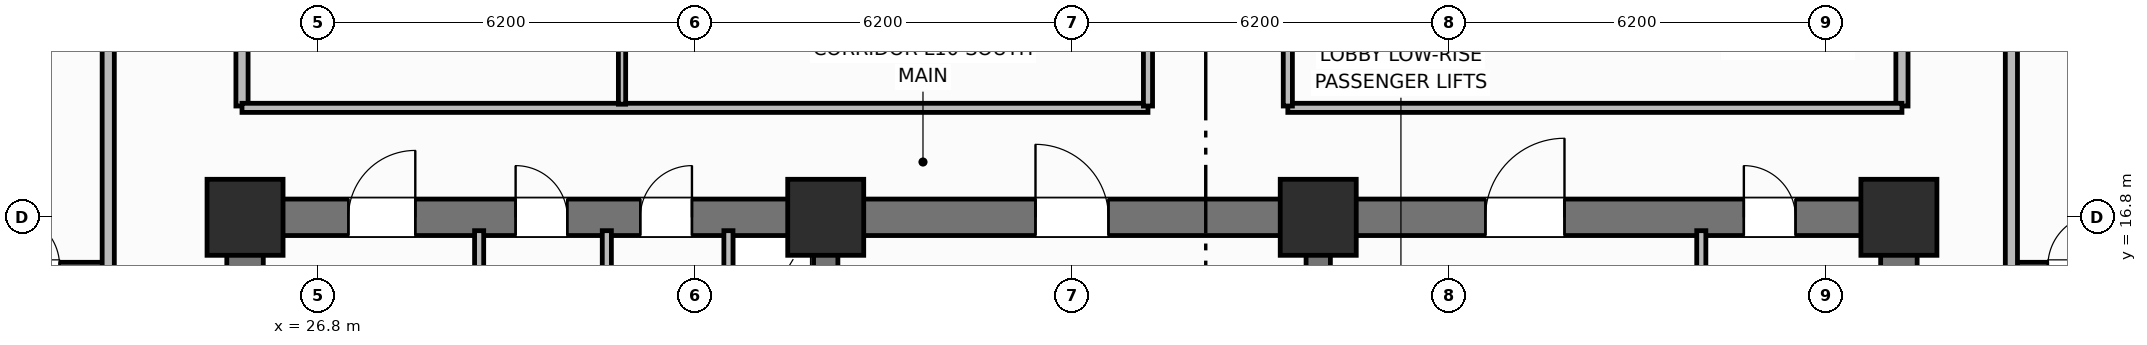
"""IFC4 building model, lengths in metres.
Left out: names, types, materials, properties, quantities, classifications, styles, units other than length and angle.
Written with IfcOpenShell. Run it as: python <this file> out.ifc"""

import sys

from ifc_helpers import new_model, si_unit, direction, frame, frame_2d, origin, origin_2d, place, context, subcontext, project, spatial, rectangle, extrude, element, fill, save


model = new_model("IFC4")
c1 = context("Model", 3, precision=1e-05, world=origin(), true_north=direction((0.0, 1.0)))
c2 = subcontext(c1, "Body", "Model", "MODEL_VIEW")
j1 = project(units=[si_unit("LENGTHUNIT", "METRE"), si_unit("PLANEANGLEUNIT", "RADIAN")], contexts=[c1])
p1 = place(None, origin())
s1 = spatial("IfcSite", under=j1, at=p1, CompositionType="ELEMENT")
p2 = place(p1, origin())
s2 = spatial("IfcBuilding", under=s1, at=p2, CompositionType="ELEMENT")
p3 = place(p2, frame((0.0, 0.0, 43.6)))
s3 = spatial("IfcBuildingStorey", under=s2, at=p3, CompositionType="ELEMENT", Elevation=43.6)
for number, where, z_axis, x_axis in (
    (1, (25.6, 10.9, 0.0), (0.0, 0.0, 1.0), (0.0, 1.0, 0.0)),
    (2, (52.8, 10.9, 0.0), (0.0, 0.0, 1.0), (0.0, 1.0, 0.0)),
):
    element("IfcWall", number, at=place(p3, frame(where, z_axis=z_axis, x_axis=x_axis)), inside=s3, PredefinedType="SHEAR", context=c2, shape_type="SweptSolid", body=[
        extrude(rectangle(XDim=5.6, YDim=0.6, at=frame_2d((2.8, 0.0))), origin(), (0.0, 0.0, 1.0), 3.7),
    ])
p4 = place(p3, frame((25.6, 16.8, 0.0), z_axis=(0.0, 0.0, 1.0), x_axis=(1.0, 0.0, 0.0)))
e3 = element("IfcWall", 3, at=p4, inside=s3, PredefinedType="SHEAR", context=c2, shape_type="SweptSolid", body=[
    extrude(rectangle(XDim=27.2, YDim=0.6, at=frame_2d((13.6, 0.0))), origin(), (0.0, 0.0, 1.0), 3.7),
])
p5 = place(p4, frame((1.7, 0.0, 0.0)))
e4 = element("IfcOpeningElement", 4, at=p5, cuts=e3, PredefinedType="OPENING", context=c2, shape_type="SweptSolid", body=[
    extrude(rectangle(XDim=1.1, YDim=2.15, at=frame_2d((0.55, 1.075))), frame((0.0, 0.31, 0.0), z_axis=(0.0, -1.0, 0.0), x_axis=(1.0, 0.0, 0.0)), (0.0, 0.0, 1.0), 0.62),
])
p6 = place(p4, frame((4.45, 0.0, 0.0)))
e5 = element("IfcOpeningElement", 5, at=p6, cuts=e3, PredefinedType="OPENING", context=c2, shape_type="SweptSolid", body=[
    extrude(rectangle(XDim=0.85, YDim=2.1, at=frame_2d((0.425, 1.05))), frame((0.0, 0.31, 0.0), z_axis=(0.0, -1.0, 0.0), x_axis=(1.0, 0.0, 0.0)), (0.0, 0.0, 1.0), 0.62),
])
p7 = place(p4, frame((6.5, 0.0, 0.0)))
e6 = element("IfcOpeningElement", 6, at=p7, cuts=e3, PredefinedType="OPENING", context=c2, shape_type="SweptSolid", body=[
    extrude(rectangle(XDim=0.85, YDim=2.1, at=frame_2d((0.425, 1.05))), frame((0.0, 0.31, 0.0), z_axis=(0.0, -1.0, 0.0), x_axis=(1.0, 0.0, 0.0)), (0.0, 0.0, 1.0), 0.62),
])
p8 = place(p4, frame((13.0, 0.0, 0.0)))
e7 = element("IfcOpeningElement", 7, at=p8, cuts=e3, PredefinedType="OPENING", context=c2, shape_type="SweptSolid", body=[
    extrude(rectangle(XDim=1.2, YDim=2.15, at=frame_2d((0.6, 1.075))), frame((0.0, 0.31, 0.0), z_axis=(0.0, -1.0, 0.0), x_axis=(1.0, 0.0, 0.0)), (0.0, 0.0, 1.0), 0.62),
])
p9 = place(p4, frame((20.4, 0.0, 0.0)))
e8 = element("IfcOpeningElement", 8, at=p9, cuts=e3, PredefinedType="OPENING", context=c2, shape_type="SweptSolid", body=[
    extrude(rectangle(XDim=1.3, YDim=2.2, at=frame_2d((0.65, 1.1))), frame((0.0, 0.31, 0.0), z_axis=(0.0, -1.0, 0.0), x_axis=(1.0, 0.0, 0.0)), (0.0, 0.0, 1.0), 0.62),
])
p10 = place(p4, frame((24.65, 0.0, 0.0)))
e9 = element("IfcOpeningElement", 9, at=p10, cuts=e3, PredefinedType="OPENING", context=c2, shape_type="SweptSolid", body=[
    extrude(rectangle(XDim=0.85, YDim=2.1, at=frame_2d((0.425, 1.05))), frame((0.0, 0.31, 0.0), z_axis=(0.0, -1.0, 0.0), x_axis=(1.0, 0.0, 0.0)), (0.0, 0.0, 1.0), 0.62),
])
for number, where, z_axis, x_axis in (
    (10, (35.15, 10.9, 0.0), (0.0, 0.0, 1.0), (0.0, 1.0, 0.0)),
    (11, (43.25, 10.9, 0.0), (0.0, 0.0, 1.0), (0.0, 1.0, 0.0)),
):
    element("IfcWall", number, at=place(p3, frame(where, z_axis=z_axis, x_axis=x_axis)), inside=s3, PredefinedType="SHEAR", context=c2, shape_type="SweptSolid", body=[
        extrude(rectangle(XDim=5.6, YDim=0.4, at=frame_2d((2.8, 0.0))), origin(), (0.0, 0.0, 1.0), 3.7),
    ])
for number, where, z_axis, x_axis in (
    (12, (25.6, 16.8, 0.0), (0.0, 0.0, 1.0), (1.0, 0.0, 0.0)),
    (13, (35.15, 16.8, 0.0), (0.0, 0.0, 1.0), (1.0, 0.0, 0.0)),
    (14, (43.25, 16.8, 0.0), (0.0, 0.0, 1.0), (1.0, 0.0, 0.0)),
    (15, (52.8, 16.8, 0.0), (0.0, 0.0, 1.0), (1.0, 0.0, 0.0)),
):
    element("IfcColumn", number, at=place(p3, frame(where, z_axis=z_axis, x_axis=x_axis)), inside=s3, PredefinedType="COLUMN", context=c2, shape_type="SweptSolid", body=[
        extrude(rectangle(XDim=1.25, YDim=1.25, at=origin_2d()), origin(), (0.0, 0.0, 1.0), 3.7),
    ])
for number, where, z_axis, x_axis in (
    (16, (29.45, 14.5, 0.0), (0.0, 0.0, 1.0), (0.0, 1.0, 0.0)),
    (17, (31.55, 14.5, 0.0), (0.0, 0.0, 1.0), (0.0, 1.0, 0.0)),
):
    element("IfcWall", number, at=place(p3, frame(where, z_axis=z_axis, x_axis=x_axis)), inside=s3, PredefinedType="PARTITIONING", context=c2, shape_type="SweptSolid", body=[
        extrude(rectangle(XDim=2.08, YDim=0.15, at=frame_2d((1.04, 0.0))), origin(), (0.0, 0.0, 1.0), 2.53),
    ])
p11 = place(p3, frame((33.55, 14.5, 0.0), z_axis=(0.0, 0.0, 1.0), x_axis=(0.0, 1.0, 0.0)))
e18 = element("IfcWall", 18, at=p11, inside=s3, PredefinedType="PARTITIONING", context=c2, shape_type="SweptSolid", body=[
    extrude(rectangle(XDim=2.08, YDim=0.15, at=frame_2d((1.04, 0.0))), origin(), (0.0, 0.0, 1.0), 2.53),
])
p12 = place(p11, frame((0.55, 0.0, 0.0)))
e19 = element("IfcOpeningElement", 19, at=p12, cuts=e18, PredefinedType="OPENING", context=c2, shape_type="SweptSolid", body=[
    extrude(rectangle(XDim=0.85, YDim=2.05, at=frame_2d((0.425, 1.025))), frame((0.0, 0.085, 0.0), z_axis=(0.0, -1.0, 0.0), x_axis=(1.0, 0.0, 0.0)), (0.0, 0.0, 1.0), 0.17),
])
p13 = place(p3, frame((49.55, 13.7, 0.0), z_axis=(0.0, 0.0, 1.0), x_axis=(0.0, 1.0, 0.0)))
e20 = element("IfcWall", 20, at=p13, inside=s3, PredefinedType="PARTITIONING", context=c2, shape_type="SweptSolid", body=[
    extrude(rectangle(XDim=2.88, YDim=0.15, at=frame_2d((1.44, 0.0))), origin(), (0.0, 0.0, 1.0), 2.53),
])
for number, where, z_axis, x_axis in (
    (21, (25.55, 18.63, 0.0), (0.0, 0.0, 1.0), (0.0, 1.0, 0.0)),
    (22, (52.85, 18.63, 0.0), (0.0, 0.0, 1.0), (0.0, 1.0, 0.0)),
):
    element("IfcWall", number, at=place(p3, frame(where, z_axis=z_axis, x_axis=x_axis)), inside=s3, PredefinedType="PARTITIONING", context=c2, shape_type="SweptSolid", body=[
        extrude(rectangle(XDim=19.14, YDim=0.2, at=frame_2d((9.57, 0.0))), origin(), (0.0, 0.0, 1.0), 2.53),
    ])
p14 = place(p3, frame((25.55, 18.6, 0.0), z_axis=(0.0, 0.0, 1.0), x_axis=(1.0, 0.0, 0.0)))
e23 = element("IfcWall", 23, at=p14, inside=s3, PredefinedType="PARTITIONING", context=c2, shape_type="SweptSolid", body=[
    extrude(rectangle(XDim=14.9, YDim=0.15, at=frame_2d((7.45, 0.0))), origin(), (0.0, 0.0, 1.0), 2.53),
])
p15 = place(p3, frame((42.75, 18.6, 0.0), z_axis=(0.0, 0.0, 1.0), x_axis=(1.0, 0.0, 0.0)))
e24 = element("IfcWall", 24, at=p15, inside=s3, PredefinedType="PARTITIONING", context=c2, shape_type="SweptSolid", body=[
    extrude(rectangle(XDim=10.1, YDim=0.15, at=frame_2d((5.05, 0.0))), origin(), (0.0, 0.0, 1.0), 2.53),
])
p16 = place(p3, frame((31.8, 18.66, 0.0), z_axis=(0.0, 0.0, 1.0), x_axis=(0.0, 1.0, 0.0)))
e25 = element("IfcWall", 25, at=p16, inside=s3, PredefinedType="PARTITIONING", context=c2, shape_type="SweptSolid", body=[
    extrude(rectangle(XDim=9.49, YDim=0.12, at=frame_2d((4.745, 0.0))), origin(), (0.0, 0.0, 1.0), 2.53),
])
p17 = place(p16, frame((2.2, 0.0, 0.0)))
e26 = element("IfcOpeningElement", 26, at=p17, cuts=e25, PredefinedType="OPENING", context=c2, shape_type="SweptSolid", body=[
    extrude(rectangle(XDim=0.9, YDim=2.1, at=frame_2d((0.45, 1.05))), frame((0.0, 0.07, 0.0), z_axis=(0.0, -1.0, 0.0), x_axis=(1.0, 0.0, 0.0)), (0.0, 0.0, 1.0), 0.14),
])
p18 = place(p3, frame((40.45, 18.63, 0.0), z_axis=(0.0, 0.0, 1.0), x_axis=(0.0, 1.0, 0.0)))
e27 = element("IfcWall", 27, at=p18, inside=s3, PredefinedType="PARTITIONING", context=c2, shape_type="SweptSolid", body=[
    extrude(rectangle(XDim=19.14, YDim=0.15, at=frame_2d((9.57, 0.0))), origin(), (0.0, 0.0, 1.0), 2.53),
])
p19 = place(p18, frame((2.4, 0.0, 0.0)))
e28 = element("IfcOpeningElement", 28, at=p19, cuts=e27, PredefinedType="OPENING", context=c2, shape_type="SweptSolid", body=[
    extrude(rectangle(XDim=1.0, YDim=2.15, at=frame_2d((0.5, 1.075))), frame((0.0, 0.085, 0.0), z_axis=(0.0, -1.0, 0.0), x_axis=(1.0, 0.0, 0.0)), (0.0, 0.0, 1.0), 0.17),
])
p20 = place(p18, frame((11.4, 0.0, 0.0)))
e29 = element("IfcOpeningElement", 29, at=p20, cuts=e27, PredefinedType="OPENING", context=c2, shape_type="SweptSolid", body=[
    extrude(rectangle(XDim=1.0, YDim=2.15, at=frame_2d((0.5, 1.075))), frame((0.0, 0.085, 0.0), z_axis=(0.0, -1.0, 0.0), x_axis=(1.0, 0.0, 0.0)), (0.0, 0.0, 1.0), 0.17),
])
p21 = place(p3, frame((42.75, 18.63, 0.0), z_axis=(0.0, 0.0, 1.0), x_axis=(0.0, 1.0, 0.0)))
e30 = element("IfcWall", 30, at=p21, inside=s3, PredefinedType="PARTITIONING", context=c2, shape_type="SweptSolid", body=[
    extrude(rectangle(XDim=19.14, YDim=0.15, at=frame_2d((9.57, 0.0))), origin(), (0.0, 0.0, 1.0), 2.53),
])
p22 = place(p21, frame((5.5, 0.0, 0.0)))
e31 = element("IfcOpeningElement", 31, at=p22, cuts=e30, PredefinedType="OPENING", context=c2, shape_type="SweptSolid", body=[
    extrude(rectangle(XDim=1.0, YDim=2.15, at=frame_2d((0.5, 1.075))), frame((0.0, 0.085, 0.0), z_axis=(0.0, -1.0, 0.0), x_axis=(1.0, 0.0, 0.0)), (0.0, 0.0, 1.0), 0.17),
])
p23 = place(p3, frame((21.1, 16.0, 0.0), z_axis=(0.0, 0.0, 1.0), x_axis=(1.0, 0.0, 0.0)))
e32 = element("IfcWall", 32, at=p23, inside=s3, PredefinedType="PARTITIONING", context=c2, shape_type="SweptSolid", body=[
    extrude(rectangle(XDim=2.25, YDim=0.12, at=frame_2d((1.125, 0.0))), origin(), (0.0, 0.0, 1.0), 2.53),
])
p24 = place(p23, frame((0.6, 0.0, 0.0)))
e33 = element("IfcOpeningElement", 33, at=p24, cuts=e32, PredefinedType="OPENING", context=c2, shape_type="SweptSolid", body=[
    extrude(rectangle(XDim=0.85, YDim=2.1, at=frame_2d((0.425, 1.05))), frame((0.0, 0.07, 0.0), z_axis=(0.0, -1.0, 0.0), x_axis=(1.0, 0.0, 0.0)), (0.0, 0.0, 1.0), 0.14),
])
p25 = place(p3, frame((23.35, 10.6, 0.0), z_axis=(0.0, 0.0, 1.0), x_axis=(0.0, 1.0, 0.0)))
e34 = element("IfcWall", 34, at=p25, inside=s3, PredefinedType="PARTITIONING", context=c2, shape_type="SweptSolid", body=[
    extrude(rectangle(XDim=35.2, YDim=0.2, at=frame_2d((17.6, 0.0))), origin(), (0.0, 0.0, 1.0), 2.53),
])
p26 = place(p25, frame((2.65, 0.0, 0.0)))
e35 = element("IfcOpeningElement", 35, at=p26, cuts=e34, PredefinedType="OPENING", context=c2, shape_type="SweptSolid", body=[
    extrude(rectangle(XDim=1.0, YDim=2.15, at=frame_2d((0.5, 1.075))), frame((0.0, 0.11, 0.0), z_axis=(0.0, -1.0, 0.0), x_axis=(1.0, 0.0, 0.0)), (0.0, 0.0, 1.0), 0.22),
])
p27 = place(p25, frame((12.65, 0.0, 0.0)))
e36 = element("IfcOpeningElement", 36, at=p27, cuts=e34, PredefinedType="OPENING", context=c2, shape_type="SweptSolid", body=[
    extrude(rectangle(XDim=1.0, YDim=2.15, at=frame_2d((0.5, 1.075))), frame((0.0, 0.11, 0.0), z_axis=(0.0, -1.0, 0.0), x_axis=(1.0, 0.0, 0.0)), (0.0, 0.0, 1.0), 0.22),
])
p28 = place(p25, frame((24.134, 0.0, 0.0)))
e37 = element("IfcOpeningElement", 37, at=p28, cuts=e34, PredefinedType="OPENING", context=c2, shape_type="SweptSolid", body=[
    extrude(rectangle(XDim=1.0, YDim=2.15, at=frame_2d((0.5, 1.075))), frame((0.0, 0.11, 0.0), z_axis=(0.0, -1.0, 0.0), x_axis=(1.0, 0.0, 0.0)), (0.0, 0.0, 1.0), 0.22),
])
p29 = place(p3, frame((54.65, 16.0, 0.0), z_axis=(0.0, 0.0, 1.0), x_axis=(1.0, 0.0, 0.0)))
e38 = element("IfcWall", 38, at=p29, inside=s3, PredefinedType="PARTITIONING", context=c2, shape_type="SweptSolid", body=[
    extrude(rectangle(XDim=2.25, YDim=0.12, at=frame_2d((1.125, 0.0))), origin(), (0.0, 0.0, 1.0), 2.53),
])
p30 = place(p29, frame((0.6, 0.0, 0.0)))
e39 = element("IfcOpeningElement", 39, at=p30, cuts=e38, PredefinedType="OPENING", context=c2, shape_type="SweptSolid", body=[
    extrude(rectangle(XDim=0.85, YDim=2.1, at=frame_2d((0.425, 1.05))), frame((0.0, 0.07, 0.0), z_axis=(0.0, -1.0, 0.0), x_axis=(1.0, 0.0, 0.0)), (0.0, 0.0, 1.0), 0.14),
])
p31 = place(p3, frame((54.65, 10.6, 0.0), z_axis=(0.0, 0.0, 1.0), x_axis=(0.0, 1.0, 0.0)))
e40 = element("IfcWall", 40, at=p31, inside=s3, PredefinedType="PARTITIONING", context=c2, shape_type="SweptSolid", body=[
    extrude(rectangle(XDim=35.2, YDim=0.2, at=frame_2d((17.6, 0.0))), origin(), (0.0, 0.0, 1.0), 2.53),
])
p32 = place(p31, frame((2.65, 0.0, 0.0)))
e41 = element("IfcOpeningElement", 41, at=p32, cuts=e40, PredefinedType="OPENING", context=c2, shape_type="SweptSolid", body=[
    extrude(rectangle(XDim=1.0, YDim=2.15, at=frame_2d((0.5, 1.075))), frame((0.0, 0.11, 0.0), z_axis=(0.0, -1.0, 0.0), x_axis=(1.0, 0.0, 0.0)), (0.0, 0.0, 1.0), 0.22),
])
p33 = place(p31, frame((19.95, 0.0, 0.0)))
e42 = element("IfcOpeningElement", 42, at=p33, cuts=e40, PredefinedType="OPENING", context=c2, shape_type="SweptSolid", body=[
    extrude(rectangle(XDim=1.0, YDim=2.15, at=frame_2d((0.5, 1.075))), frame((0.0, 0.11, 0.0), z_axis=(0.0, -1.0, 0.0), x_axis=(1.0, 0.0, 0.0)), (0.0, 0.0, 1.0), 0.22),
])
p34 = place(p24, origin())
e43 = element("IfcDoor", 43, at=p34, inside=s3, OperationType="SINGLE_SWING_LEFT", PredefinedType="DOOR", context=c2, shape_type="SweptSolid", body=[
    extrude(rectangle(XDim=0.85, YDim=2.1, at=frame_2d((0.425, 1.05))), frame((0.0, 0.025, 0.0), z_axis=(0.0, -1.0, 0.0), x_axis=(1.0, 0.0, 0.0)), (0.0, 0.0, 1.0), 0.05),
])
fill(e33, e43)
p35 = place(p30, origin())
e44 = element("IfcDoor", 44, at=p35, inside=s3, OperationType="SINGLE_SWING_RIGHT", PredefinedType="DOOR", context=c2, shape_type="SweptSolid", body=[
    extrude(rectangle(XDim=0.85, YDim=2.1, at=frame_2d((0.425, 1.05))), frame((0.0, 0.025, 0.0), z_axis=(0.0, -1.0, 0.0), x_axis=(1.0, 0.0, 0.0)), (0.0, 0.0, 1.0), 0.05),
])
fill(e39, e44)
p36 = place(p5, origin())
e45 = element("IfcDoor", 45, at=p36, inside=s3, OperationType="SINGLE_SWING_RIGHT", PredefinedType="DOOR", context=c2, shape_type="SweptSolid", body=[
    extrude(rectangle(XDim=1.1, YDim=2.15, at=frame_2d((0.55, 1.075))), frame((0.0, 0.025, 0.0), z_axis=(0.0, -1.0, 0.0), x_axis=(1.0, 0.0, 0.0)), (0.0, 0.0, 1.0), 0.05),
])
fill(e4, e45)
p37 = place(p6, origin())
e46 = element("IfcDoor", 46, at=p37, inside=s3, OperationType="SINGLE_SWING_LEFT", PredefinedType="DOOR", context=c2, shape_type="SweptSolid", body=[
    extrude(rectangle(XDim=0.85, YDim=2.1, at=frame_2d((0.425, 1.05))), frame((0.0, 0.025, 0.0), z_axis=(0.0, -1.0, 0.0), x_axis=(1.0, 0.0, 0.0)), (0.0, 0.0, 1.0), 0.05),
])
fill(e5, e46)
p38 = place(p7, origin())
e47 = element("IfcDoor", 47, at=p38, inside=s3, OperationType="SINGLE_SWING_RIGHT", PredefinedType="DOOR", context=c2, shape_type="SweptSolid", body=[
    extrude(rectangle(XDim=0.85, YDim=2.1, at=frame_2d((0.425, 1.05))), frame((0.0, 0.025, 0.0), z_axis=(0.0, -1.0, 0.0), x_axis=(1.0, 0.0, 0.0)), (0.0, 0.0, 1.0), 0.05),
])
fill(e6, e47)
p39 = place(p8, origin())
e48 = element("IfcDoor", 48, at=p39, inside=s3, OperationType="SINGLE_SWING_LEFT", PredefinedType="DOOR", context=c2, shape_type="SweptSolid", body=[
    extrude(rectangle(XDim=1.2, YDim=2.15, at=frame_2d((0.6, 1.075))), frame((0.0, 0.025, 0.0), z_axis=(0.0, -1.0, 0.0), x_axis=(1.0, 0.0, 0.0)), (0.0, 0.0, 1.0), 0.05),
])
fill(e7, e48)
p40 = place(p9, origin())
e49 = element("IfcDoor", 49, at=p40, inside=s3, OperationType="SINGLE_SWING_RIGHT", PredefinedType="DOOR", context=c2, shape_type="SweptSolid", body=[
    extrude(rectangle(XDim=1.3, YDim=2.2, at=frame_2d((0.65, 1.1))), frame((0.0, 0.025, 0.0), z_axis=(0.0, -1.0, 0.0), x_axis=(1.0, 0.0, 0.0)), (0.0, 0.0, 1.0), 0.05),
])
fill(e8, e49)
p41 = place(p10, origin())
e50 = element("IfcDoor", 50, at=p41, inside=s3, OperationType="SINGLE_SWING_LEFT", PredefinedType="DOOR", context=c2, shape_type="SweptSolid", body=[
    extrude(rectangle(XDim=0.85, YDim=2.1, at=frame_2d((0.425, 1.05))), frame((0.0, 0.025, 0.0), z_axis=(0.0, -1.0, 0.0), x_axis=(1.0, 0.0, 0.0)), (0.0, 0.0, 1.0), 0.05),
])
fill(e9, e50)
save(model, sys.argv[1])
